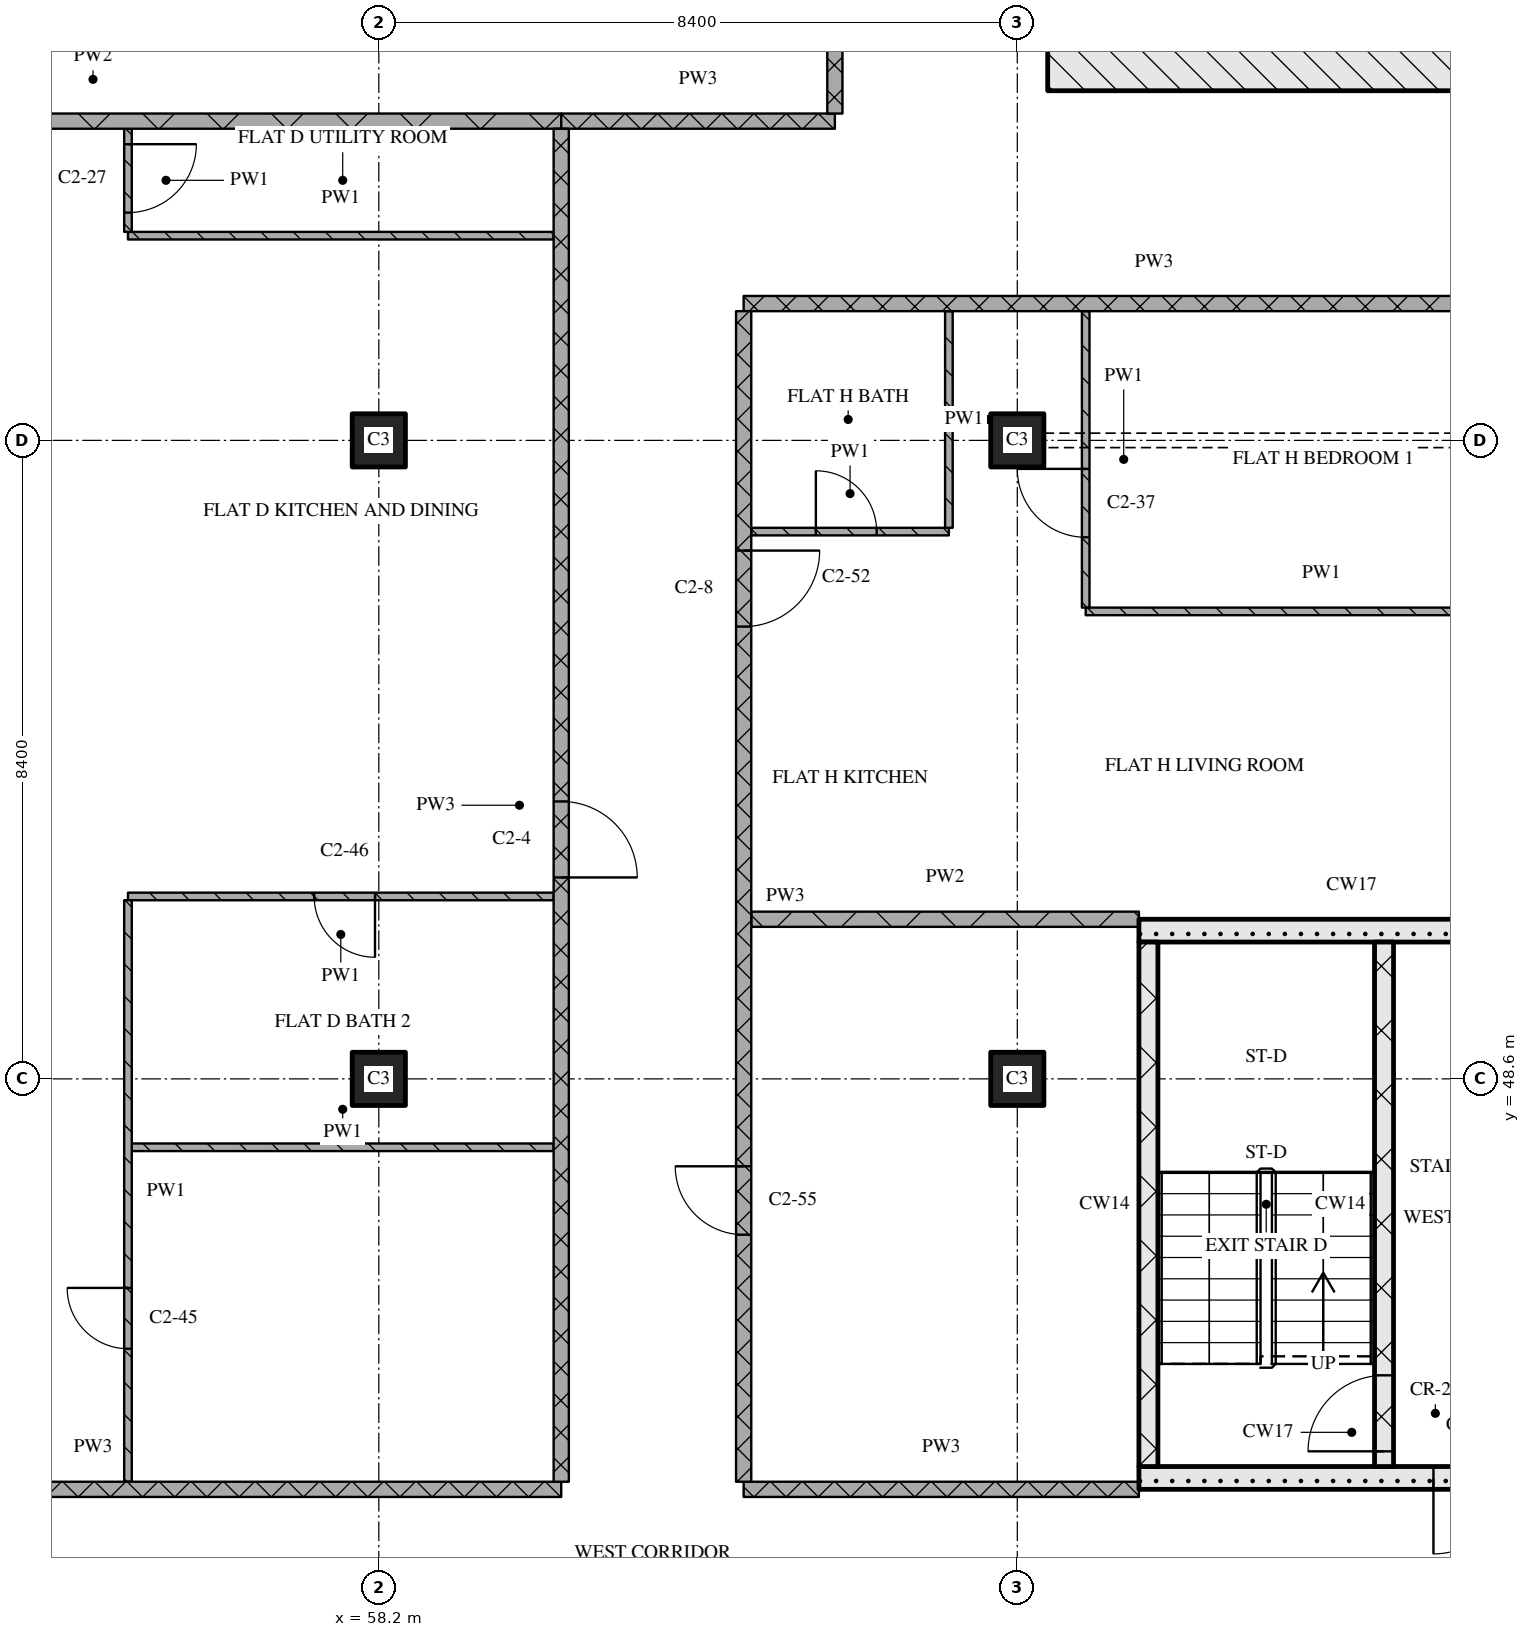
"""IFC4 building model, lengths in metres.
Left out: names, types, materials, properties, quantities, classifications, styles, units other than length and angle.
Written with IfcOpenShell. Run it as: python <this file> out.ifc"""

import sys

from ifc_helpers import new_model, si_unit, direction, frame, frame_2d, origin, origin_2d, place, context, subcontext, project, spatial, rectangle, extrude, element, fill, save


model = new_model("IFC4")
c1 = context("Model", 3, precision=1e-05, world=origin(), true_north=direction((0.0, 1.0)))
c2 = subcontext(c1, "Body", "Model", "MODEL_VIEW")
j1 = project(units=[si_unit("LENGTHUNIT", "METRE"), si_unit("PLANEANGLEUNIT", "RADIAN")], contexts=[c1])
p1 = place(None, origin())
s1 = spatial("IfcSite", under=j1, at=p1, CompositionType="ELEMENT")
p2 = place(p1, origin())
s2 = spatial("IfcBuilding", under=s1, at=p2, CompositionType="ELEMENT")
p3 = place(p2, frame((0.0, 0.0, 158.25)))
s3 = spatial("IfcBuildingStorey", under=s2, at=p3, CompositionType="ELEMENT", Elevation=158.25)
for number, where, z_axis, x_axis in (
    (1, (58.2, 48.6, 0.0), (0.0, 0.0, 1.0), (1.0, 0.0, 0.0)),
    (2, (58.2, 57.0, 0.0), (0.0, 0.0, 1.0), (1.0, 0.0, 0.0)),
    (3, (66.6, 48.6, 0.0), (0.0, 0.0, 1.0), (1.0, 0.0, 0.0)),
    (4, (66.6, 57.0, 0.0), (0.0, 0.0, 1.0), (1.0, 0.0, 0.0)),
):
    element("IfcColumn", number, at=place(p3, frame(where, z_axis=z_axis, x_axis=x_axis)), inside=s3, PredefinedType="COLUMN", context=c2, shape_type="SweptSolid", body=[
        extrude(rectangle(XDim=0.7, YDim=0.7, at=origin_2d()), origin(), (0.0, 0.0, 1.0), 3.6),
    ])
p4 = place(p3, frame((67.0, 62.0, 0.0), z_axis=(0.0, 0.0, 1.0), x_axis=(1.0, 0.0, 0.0)))
e5 = element("IfcWall", 5, at=p4, inside=s3, PredefinedType="SOLIDWALL", context=c2, shape_type="SweptSolid", body=[
    extrude(rectangle(XDim=41.2, YDim=0.8, at=frame_2d((20.6, 0.0))), origin(), (0.0, 0.0, 1.0), 3.32),
])
p5 = place(p4, frame((20.95, 0.0, 0.0)))
e6 = element("IfcOpeningElement", 6, at=p5, cuts=e5, PredefinedType="OPENING", context=c2, shape_type="SweptSolid", body=[
    extrude(rectangle(XDim=1.8, YDim=2.1, at=frame_2d((0.9, 1.05))), frame((0.0, 0.41, 0.0), z_axis=(0.0, -1.0, 0.0), x_axis=(1.0, 0.0, 0.0)), (0.0, 0.0, 1.0), 0.82),
])
p6 = place(p3, frame((68.2, 43.35, 0.0), z_axis=(0.0, 0.0, 1.0), x_axis=(1.0, 0.0, 0.0)))
e7 = element("IfcWall", 7, at=p6, inside=s3, PredefinedType="SOLIDWALL", context=c2, shape_type="SweptSolid", body=[
    extrude(rectangle(XDim=5.6, YDim=0.3, at=frame_2d((2.8, 0.0))), origin(), (0.0, 0.0, 1.0), 3.32),
])
p7 = place(p6, frame((3.875, 0.0, 0.0)))
e8 = element("IfcOpeningElement", 8, at=p7, cuts=e7, PredefinedType="OPENING", context=c2, shape_type="SweptSolid", body=[
    extrude(rectangle(XDim=1.0, YDim=2.1, at=frame_2d((0.5, 1.05))), frame((0.0, 0.16, 0.0), z_axis=(0.0, -1.0, 0.0), x_axis=(1.0, 0.0, 0.0)), (0.0, 0.0, 1.0), 0.32),
])
p8 = place(p3, frame((68.325, 43.5, 0.0), z_axis=(0.0, 0.0, 1.0), x_axis=(0.0, 1.0, 0.0)))
e9 = element("IfcWall", 9, at=p8, inside=s3, PredefinedType="SOLIDWALL", context=c2, shape_type="SweptSolid", body=[
    extrude(rectangle(XDim=6.9, YDim=0.25, at=frame_2d((3.45, 0.0))), origin(), (0.0, 0.0, 1.0), 3.32),
])
p9 = place(p3, frame((71.425, 43.5, 0.0), z_axis=(0.0, 0.0, 1.0), x_axis=(0.0, 1.0, 0.0)))
e10 = element("IfcWall", 10, at=p9, inside=s3, PredefinedType="SOLIDWALL", context=c2, shape_type="SweptSolid", body=[
    extrude(rectangle(XDim=6.9, YDim=0.25, at=frame_2d((3.45, 0.0))), origin(), (0.0, 0.0, 1.0), 3.32),
])
p10 = place(p9, frame((0.2, 0.0, 0.0)))
e11 = element("IfcOpeningElement", 11, at=p10, cuts=e10, PredefinedType="OPENING", context=c2, shape_type="SweptSolid", body=[
    extrude(rectangle(XDim=1.0, YDim=2.1, at=frame_2d((0.5, 1.05))), frame((0.0, 0.135, 0.0), z_axis=(0.0, -1.0, 0.0), x_axis=(1.0, 0.0, 0.0)), (0.0, 0.0, 1.0), 0.27),
])
p11 = place(p3, frame((68.2, 50.55, 0.0), z_axis=(0.0, 0.0, 1.0), x_axis=(1.0, 0.0, 0.0)))
e12 = element("IfcWall", 12, at=p11, inside=s3, PredefinedType="SOLIDWALL", context=c2, shape_type="SweptSolid", body=[
    extrude(rectangle(XDim=5.6, YDim=0.3, at=frame_2d((2.8, 0.0))), origin(), (0.0, 0.0, 1.0), 3.32),
])
p12 = place(p3, frame((48.28, 43.2, 0.0), z_axis=(0.0, 0.0, 1.0), x_axis=(1.0, 0.0, 0.0)))
e13 = element("IfcWall", 13, at=p12, inside=s3, PredefinedType="PARTITIONING", context=c2, shape_type="SweptSolid", body=[
    extrude(rectangle(XDim=12.32, YDim=0.2, at=frame_2d((6.16, 0.0))), origin(), (0.0, 0.0, 1.0), 3.32),
])
p13 = place(p3, frame((63.0, 43.2, 0.0), z_axis=(0.0, 0.0, 1.0), x_axis=(1.0, 0.0, 0.0)))
e14 = element("IfcWall", 14, at=p13, inside=s3, PredefinedType="PARTITIONING", context=c2, shape_type="SweptSolid", body=[
    extrude(rectangle(XDim=5.2, YDim=0.2, at=frame_2d((2.6, 0.0))), origin(), (0.0, 0.0, 1.0), 3.32),
])
p14 = place(p3, frame((54.95, 47.7, 0.0), z_axis=(0.0, 0.0, 1.0), x_axis=(1.0, 0.0, 0.0)))
e15 = element("IfcWall", 15, at=p14, inside=s3, PredefinedType="PARTITIONING", context=c2, shape_type="SweptSolid", body=[
    extrude(rectangle(XDim=5.55, YDim=0.1, at=frame_2d((2.775, 0.0))), origin(), (0.0, 0.0, 1.0), 3.32),
])
p15 = place(p3, frame((63.1, 50.7, 0.0), z_axis=(0.0, 0.0, 1.0), x_axis=(1.0, 0.0, 0.0)))
e16 = element("IfcWall", 16, at=p15, inside=s3, PredefinedType="PARTITIONING", context=c2, shape_type="SweptSolid", body=[
    extrude(rectangle(XDim=5.1, YDim=0.2, at=frame_2d((2.55, 0.0))), origin(), (0.0, 0.0, 1.0), 3.32),
])
p16 = place(p3, frame((60.5, 51.0, 0.0), z_axis=(0.0, 0.0, 1.0), x_axis=(-1.0, 0.0, 0.0)))
e17 = element("IfcWall", 17, at=p16, inside=s3, PredefinedType="PARTITIONING", context=c2, shape_type="SweptSolid", body=[
    extrude(rectangle(XDim=5.6, YDim=0.1, at=frame_2d((2.8, 0.0))), origin(), (0.0, 0.0, 1.0), 3.32),
])
p17 = place(p16, frame((2.35, 0.0, 0.0)))
e18 = element("IfcOpeningElement", 18, at=p17, cuts=e17, PredefinedType="OPENING", context=c2, shape_type="SweptSolid", body=[
    extrude(rectangle(XDim=0.8, YDim=2.1, at=frame_2d((0.4, 1.05))), frame((0.0, 0.06, 0.0), z_axis=(0.0, -1.0, 0.0), x_axis=(1.0, 0.0, 0.0)), (0.0, 0.0, 1.0), 0.12),
])
p18 = place(p3, frame((67.5, 54.75, 0.0), z_axis=(0.0, 0.0, 1.0), x_axis=(1.0, 0.0, 0.0)))
e19 = element("IfcWall", 19, at=p18, inside=s3, PredefinedType="PARTITIONING", context=c2, shape_type="SweptSolid", body=[
    extrude(rectangle(XDim=6.2, YDim=0.1, at=frame_2d((3.1, 0.0))), origin(), (0.0, 0.0, 1.0), 3.32),
])
p19 = place(p3, frame((63.1, 55.8, 0.0), z_axis=(0.0, 0.0, 1.0), x_axis=(1.0, 0.0, 0.0)))
e20 = element("IfcWall", 20, at=p19, inside=s3, PredefinedType="PARTITIONING", context=c2, shape_type="SweptSolid", body=[
    extrude(rectangle(XDim=2.6, YDim=0.1, at=frame_2d((1.3, 0.0))), origin(), (0.0, 0.0, 1.0), 3.32),
])
p20 = place(p19, frame((0.85, 0.0, 0.0)))
e21 = element("IfcOpeningElement", 21, at=p20, cuts=e20, PredefinedType="OPENING", context=c2, shape_type="SweptSolid", body=[
    extrude(rectangle(XDim=0.8, YDim=2.1, at=frame_2d((0.4, 1.05))), frame((0.0, 0.06, 0.0), z_axis=(0.0, -1.0, 0.0), x_axis=(1.0, 0.0, 0.0)), (0.0, 0.0, 1.0), 0.12),
])
p21 = place(p3, frame((63.0, 58.8, 0.0), z_axis=(0.0, 0.0, 1.0), x_axis=(1.0, 0.0, 0.0)))
e22 = element("IfcWall", 22, at=p21, inside=s3, PredefinedType="PARTITIONING", context=c2, shape_type="SweptSolid", body=[
    extrude(rectangle(XDim=10.8, YDim=0.2, at=frame_2d((5.4, 0.0))), origin(), (0.0, 0.0, 1.0), 3.32),
])
p22 = place(p3, frame((54.9, 59.693, 0.0), z_axis=(0.0, 0.0, 1.0), x_axis=(1.0, 0.0, 0.0)))
e23 = element("IfcWall", 23, at=p22, inside=s3, PredefinedType="PARTITIONING", context=c2, shape_type="SweptSolid", body=[
    extrude(rectangle(XDim=5.6, YDim=0.1, at=frame_2d((2.8, 0.0))), origin(), (0.0, 0.0, 1.0), 3.32),
])
p23 = place(p3, frame((60.6, 61.2, 0.0), z_axis=(0.0, 0.0, 1.0), x_axis=(1.0, 0.0, 0.0)))
e24 = element("IfcWall", 24, at=p23, inside=s3, PredefinedType="PARTITIONING", context=c2, shape_type="SweptSolid", body=[
    extrude(rectangle(XDim=3.6, YDim=0.2, at=frame_2d((1.8, 0.0))), origin(), (0.0, 0.0, 1.0), 3.32),
])
p24 = place(p3, frame((48.28, 61.2, 0.0), z_axis=(0.0, 0.0, 1.0), x_axis=(1.0, 0.0, 0.0)))
e25 = element("IfcWall", 25, at=p24, inside=s3, PredefinedType="PARTITIONING", context=c2, shape_type="SweptSolid", body=[
    extrude(rectangle(XDim=12.32, YDim=0.2, at=frame_2d((6.16, 0.0))), origin(), (0.0, 0.0, 1.0), 3.32),
])
p25 = place(p3, frame((54.9, 50.95, 0.0), z_axis=(0.0, 0.0, 1.0), x_axis=(0.0, -1.0, 0.0)))
e26 = element("IfcWall", 26, at=p25, inside=s3, PredefinedType="PARTITIONING", context=c2, shape_type="SweptSolid", body=[
    extrude(rectangle(XDim=7.65, YDim=0.1, at=frame_2d((3.825, 0.0))), origin(), (0.0, 0.0, 1.0), 3.32),
])
p26 = place(p25, frame((5.1, 0.0, 0.0)))
e27 = element("IfcOpeningElement", 27, at=p26, cuts=e26, PredefinedType="OPENING", context=c2, shape_type="SweptSolid", body=[
    extrude(rectangle(XDim=0.8, YDim=2.1, at=frame_2d((0.4, 1.05))), frame((0.0, 0.06, 0.0), z_axis=(0.0, -1.0, 0.0), x_axis=(1.0, 0.0, 0.0)), (0.0, 0.0, 1.0), 0.12),
])
p27 = place(p3, frame((54.9, 61.1, 0.0), z_axis=(0.0, 0.0, 1.0), x_axis=(0.0, -1.0, 0.0)))
e28 = element("IfcWall", 28, at=p27, inside=s3, PredefinedType="PARTITIONING", context=c2, shape_type="SweptSolid", body=[
    extrude(rectangle(XDim=1.357, YDim=0.1, at=frame_2d((0.679, 0.0))), origin(), (0.0, 0.0, 1.0), 3.32),
])
p28 = place(p27, frame((0.204, 0.0, 0.0)))
e29 = element("IfcOpeningElement", 29, at=p28, cuts=e28, PredefinedType="OPENING", context=c2, shape_type="SweptSolid", body=[
    extrude(rectangle(XDim=0.9, YDim=2.1, at=frame_2d((0.45, 1.05))), frame((0.0, 0.06, 0.0), z_axis=(0.0, -1.0, 0.0), x_axis=(1.0, 0.0, 0.0)), (0.0, 0.0, 1.0), 0.12),
])
p29 = place(p3, frame((60.6, 43.3, 0.0), z_axis=(0.0, 0.0, 1.0), x_axis=(0.0, 1.0, 0.0)))
e30 = element("IfcWall", 30, at=p29, inside=s3, PredefinedType="PARTITIONING", context=c2, shape_type="SweptSolid", body=[
    extrude(rectangle(XDim=17.8, YDim=0.2, at=frame_2d((8.9, 0.0))), origin(), (0.0, 0.0, 1.0), 3.32),
])
p30 = place(p29, frame((7.95, 0.0, 0.0)))
e31 = element("IfcOpeningElement", 31, at=p30, cuts=e30, PredefinedType="OPENING", context=c2, shape_type="SweptSolid", body=[
    extrude(rectangle(XDim=1.0, YDim=2.1, at=frame_2d((0.5, 1.05))), frame((0.0, 0.11, 0.0), z_axis=(0.0, -1.0, 0.0), x_axis=(1.0, 0.0, 0.0)), (0.0, 0.0, 1.0), 0.22),
])
p31 = place(p3, frame((63.0, 58.7, 0.0), z_axis=(0.0, 0.0, 1.0), x_axis=(0.0, -1.0, 0.0)))
e32 = element("IfcWall", 32, at=p31, inside=s3, PredefinedType="PARTITIONING", context=c2, shape_type="SweptSolid", body=[
    extrude(rectangle(XDim=15.4, YDim=0.2, at=frame_2d((7.7, 0.0))), origin(), (0.0, 0.0, 1.0), 3.32),
])
p32 = place(p31, frame((3.15, 0.0, 0.0)))
e33 = element("IfcOpeningElement", 33, at=p32, cuts=e32, PredefinedType="OPENING", context=c2, shape_type="SweptSolid", body=[
    extrude(rectangle(XDim=1.0, YDim=2.1, at=frame_2d((0.5, 1.05))), frame((0.0, 0.11, 0.0), z_axis=(0.0, -1.0, 0.0), x_axis=(1.0, 0.0, 0.0)), (0.0, 0.0, 1.0), 0.22),
])
p33 = place(p31, frame((11.25, 0.0, 0.0)))
e34 = element("IfcOpeningElement", 34, at=p33, cuts=e32, PredefinedType="OPENING", context=c2, shape_type="SweptSolid", body=[
    extrude(rectangle(XDim=0.9, YDim=2.1, at=frame_2d((0.45, 1.05))), frame((0.0, 0.11, 0.0), z_axis=(0.0, -1.0, 0.0), x_axis=(1.0, 0.0, 0.0)), (0.0, 0.0, 1.0), 0.22),
])
p34 = place(p3, frame((64.2, 61.3, 0.0), z_axis=(0.0, 0.0, 1.0), x_axis=(0.0, 1.0, 0.0)))
e35 = element("IfcWall", 35, at=p34, inside=s3, PredefinedType="PARTITIONING", context=c2, shape_type="SweptSolid", body=[
    extrude(rectangle(XDim=14.02, YDim=0.2, at=frame_2d((7.01, 0.0))), origin(), (0.0, 0.0, 1.0), 3.32),
])
p35 = place(p34, frame((8.55, 0.0, 0.0)))
e36 = element("IfcOpeningElement", 36, at=p35, cuts=e35, PredefinedType="OPENING", context=c2, shape_type="SweptSolid", body=[
    extrude(rectangle(XDim=1.0, YDim=2.1, at=frame_2d((0.5, 1.05))), frame((0.0, 0.11, 0.0), z_axis=(0.0, -1.0, 0.0), x_axis=(1.0, 0.0, 0.0)), (0.0, 0.0, 1.0), 0.22),
])
p36 = place(p3, frame((65.7, 58.7, 0.0), z_axis=(0.0, 0.0, 1.0), x_axis=(0.0, -1.0, 0.0)))
e37 = element("IfcWall", 37, at=p36, inside=s3, PredefinedType="PARTITIONING", context=c2, shape_type="SweptSolid", body=[
    extrude(rectangle(XDim=2.85, YDim=0.1, at=frame_2d((1.425, 0.0))), origin(), (0.0, 0.0, 1.0), 3.32),
])
p37 = place(p3, frame((67.5, 58.7, 0.0), z_axis=(0.0, 0.0, 1.0), x_axis=(0.0, -1.0, 0.0)))
e38 = element("IfcWall", 38, at=p37, inside=s3, PredefinedType="PARTITIONING", context=c2, shape_type="SweptSolid", body=[
    extrude(rectangle(XDim=3.9, YDim=0.1, at=frame_2d((1.95, 0.0))), origin(), (0.0, 0.0, 1.0), 3.32),
])
p38 = place(p37, frame((2.075, 0.0, 0.0)))
e39 = element("IfcOpeningElement", 39, at=p38, cuts=e38, PredefinedType="OPENING", context=c2, shape_type="SweptSolid", body=[
    extrude(rectangle(XDim=0.9, YDim=2.1, at=frame_2d((0.45, 1.05))), frame((0.0, 0.06, 0.0), z_axis=(0.0, -1.0, 0.0), x_axis=(1.0, 0.0, 0.0)), (0.0, 0.0, 1.0), 0.12),
])
p39 = place(p7, origin())
e40 = element("IfcDoor", 40, at=p39, inside=s3, OperationType="SINGLE_SWING_RIGHT", PredefinedType="DOOR", context=c2, shape_type="SweptSolid", body=[
    extrude(rectangle(XDim=1.0, YDim=2.1, at=frame_2d((0.5, 1.05))), frame((0.0, 0.025, 0.0), z_axis=(0.0, -1.0, 0.0), x_axis=(1.0, 0.0, 0.0)), (0.0, 0.0, 1.0), 0.05),
])
fill(e8, e40)
p40 = place(p10, origin())
e41 = element("IfcDoor", 41, at=p40, inside=s3, OperationType="SINGLE_SWING_LEFT", PredefinedType="DOOR", context=c2, shape_type="SweptSolid", body=[
    extrude(rectangle(XDim=1.0, YDim=2.1, at=frame_2d((0.5, 1.05))), frame((0.0, 0.025, 0.0), z_axis=(0.0, -1.0, 0.0), x_axis=(1.0, 0.0, 0.0)), (0.0, 0.0, 1.0), 0.05),
])
fill(e11, e41)
p41 = place(p17, origin())
e42 = element("IfcDoor", 42, at=p41, inside=s3, OperationType="SINGLE_SWING_LEFT", PredefinedType="DOOR", context=c2, shape_type="SweptSolid", body=[
    extrude(rectangle(XDim=0.8, YDim=2.1, at=frame_2d((0.4, 1.05))), frame((0.0, 0.025, 0.0), z_axis=(0.0, -1.0, 0.0), x_axis=(1.0, 0.0, 0.0)), (0.0, 0.0, 1.0), 0.05),
])
fill(e18, e42)
p42 = place(p20, origin())
e43 = element("IfcDoor", 43, at=p42, inside=s3, OperationType="SINGLE_SWING_LEFT", PredefinedType="DOOR", context=c2, shape_type="SweptSolid", body=[
    extrude(rectangle(XDim=0.8, YDim=2.1, at=frame_2d((0.4, 1.05))), frame((0.0, 0.025, 0.0), z_axis=(0.0, -1.0, 0.0), x_axis=(1.0, 0.0, 0.0)), (0.0, 0.0, 1.0), 0.05),
])
fill(e21, e43)
p43 = place(p26, origin())
e44 = element("IfcDoor", 44, at=p43, inside=s3, OperationType="SINGLE_SWING_RIGHT", PredefinedType="DOOR", context=c2, shape_type="SweptSolid", body=[
    extrude(rectangle(XDim=0.8, YDim=2.1, at=frame_2d((0.4, 1.05))), frame((0.0, 0.025, 0.0), z_axis=(0.0, -1.0, 0.0), x_axis=(1.0, 0.0, 0.0)), (0.0, 0.0, 1.0), 0.05),
])
fill(e27, e44)
p44 = place(p28, origin())
e45 = element("IfcDoor", 45, at=p44, inside=s3, OperationType="SINGLE_SWING_LEFT", PredefinedType="DOOR", context=c2, shape_type="SweptSolid", body=[
    extrude(rectangle(XDim=0.9, YDim=2.1, at=frame_2d((0.45, 1.05))), frame((0.0, 0.025, 0.0), z_axis=(0.0, -1.0, 0.0), x_axis=(1.0, 0.0, 0.0)), (0.0, 0.0, 1.0), 0.05),
])
fill(e29, e45)
p45 = place(p30, origin())
e46 = element("IfcDoor", 46, at=p45, inside=s3, OperationType="SINGLE_SWING_RIGHT", PredefinedType="DOOR", context=c2, shape_type="SweptSolid", body=[
    extrude(rectangle(XDim=1.0, YDim=2.1, at=frame_2d((0.5, 1.05))), frame((0.0, 0.025, 0.0), z_axis=(0.0, -1.0, 0.0), x_axis=(1.0, 0.0, 0.0)), (0.0, 0.0, 1.0), 0.05),
])
fill(e31, e46)
p46 = place(p32, origin())
e47 = element("IfcDoor", 47, at=p46, inside=s3, OperationType="SINGLE_SWING_LEFT", PredefinedType="DOOR", context=c2, shape_type="SweptSolid", body=[
    extrude(rectangle(XDim=1.0, YDim=2.1, at=frame_2d((0.5, 1.05))), frame((0.0, 0.025, 0.0), z_axis=(0.0, -1.0, 0.0), x_axis=(1.0, 0.0, 0.0)), (0.0, 0.0, 1.0), 0.05),
])
fill(e33, e47)
p47 = place(p33, origin())
e48 = element("IfcDoor", 48, at=p47, inside=s3, OperationType="SINGLE_SWING_RIGHT", PredefinedType="DOOR", context=c2, shape_type="SweptSolid", body=[
    extrude(rectangle(XDim=0.9, YDim=2.1, at=frame_2d((0.45, 1.05))), frame((0.0, 0.025, 0.0), z_axis=(0.0, -1.0, 0.0), x_axis=(1.0, 0.0, 0.0)), (0.0, 0.0, 1.0), 0.05),
])
fill(e34, e48)
p48 = place(p38, origin())
e49 = element("IfcDoor", 49, at=p48, inside=s3, OperationType="SINGLE_SWING_RIGHT", PredefinedType="DOOR", context=c2, shape_type="SweptSolid", body=[
    extrude(rectangle(XDim=0.9, YDim=2.1, at=frame_2d((0.45, 1.05))), frame((0.0, 0.025, 0.0), z_axis=(0.0, -1.0, 0.0), x_axis=(1.0, 0.0, 0.0)), (0.0, 0.0, 1.0), 0.05),
])
fill(e39, e49)
save(model, sys.argv[1])
